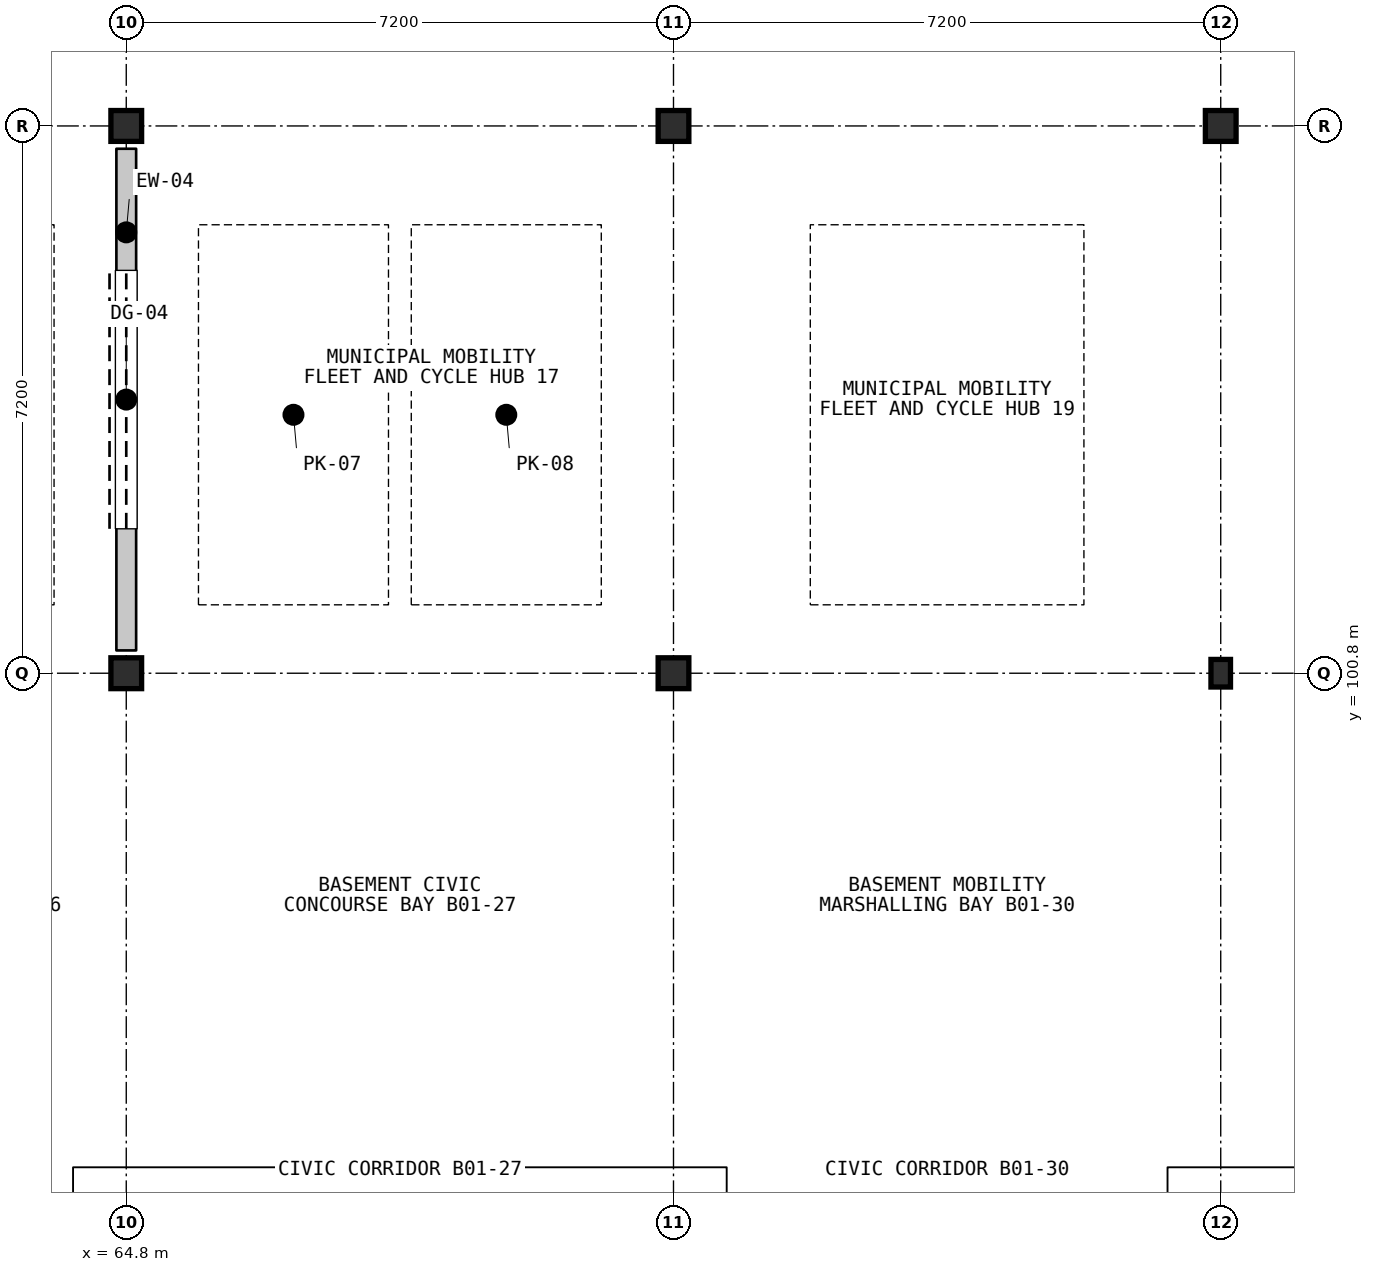
"""IFC4 building model, lengths in metres.
Left out: names, types, materials, properties, quantities, classifications, styles, units other than length and angle.
Written with IfcOpenShell. Run it as: python <this file> out.ifc"""

import sys

from ifc_helpers import new_model, si_unit, direction, frame, frame_2d, origin, origin_2d, place, context, subcontext, project, spatial, rectangle, i_section, extrude, element, fill, save


model = new_model("IFC4")
c1 = context("Model", 3, precision=1e-05, world=origin(), true_north=direction((0.0, 1.0)))
c2 = subcontext(c1, "Body", "Model", "MODEL_VIEW")
j1 = project(units=[si_unit("LENGTHUNIT", "METRE"), si_unit("PLANEANGLEUNIT", "RADIAN")], contexts=[c1])
p1 = place(None, origin())
s1 = spatial("IfcSite", under=j1, at=p1, CompositionType="ELEMENT")
p2 = place(p1, origin())
s2 = spatial("IfcBuilding", under=s1, at=p2, CompositionType="ELEMENT")
p3 = place(p2, frame((0.0, 0.0, -4.2)))
s3 = spatial("IfcBuildingStorey", under=s2, at=p3, CompositionType="ELEMENT", Elevation=-4.2)
for number, where, z_axis, x_axis in (
    (1, (64.8, 100.8, 0.0), (0.0, 0.0, 1.0), (1.0, 0.0, 0.0)),
    (2, (64.8, 108.0, 0.0), (0.0, 0.0, 1.0), (1.0, 0.0, 0.0)),
    (3, (72.0, 100.8, 0.0), (0.0, 0.0, 1.0), (1.0, 0.0, 0.0)),
    (4, (72.0, 108.0, 0.0), (0.0, 0.0, 1.0), (1.0, 0.0, 0.0)),
):
    element("IfcColumn", number, at=place(p3, frame(where, z_axis=z_axis, x_axis=x_axis)), inside=s3, PredefinedType="COLUMN", context=c2, shape_type="SweptSolid", body=[
        extrude(i_section(OverallWidth=0.404, OverallDepth=0.406, WebThickness=0.027, FlangeThickness=0.044, FilletRadius=0.015, at=origin_2d()), origin(), (0.0, 0.0, 1.0), 4.2),
    ])
p4 = place(p3, frame((79.2, 100.8, 0.0), z_axis=(0.0, 0.0, 1.0), x_axis=(1.0, 0.0, 0.0)))
e5 = element("IfcColumn", 5, at=p4, inside=s3, PredefinedType="COLUMN", context=c2, shape_type="SweptSolid", body=[
    extrude(i_section(OverallWidth=0.257, OverallDepth=0.363, WebThickness=0.013, FlangeThickness=0.022, FilletRadius=0.015, at=origin_2d()), origin(), (0.0, 0.0, 1.0), 4.2),
])
p5 = place(p3, frame((79.2, 108.0, 0.0), z_axis=(0.0, 0.0, 1.0), x_axis=(1.0, 0.0, 0.0)))
e6 = element("IfcColumn", 6, at=p5, inside=s3, PredefinedType="COLUMN", context=c2, shape_type="SweptSolid", body=[
    extrude(i_section(OverallWidth=0.404, OverallDepth=0.406, WebThickness=0.027, FlangeThickness=0.044, FilletRadius=0.015, at=origin_2d()), origin(), (0.0, 0.0, 1.0), 4.2),
])
p6 = place(p3, frame((64.8, 101.1, 0.0), z_axis=(0.0, 0.0, 1.0), x_axis=(0.0, 1.0, 0.0)))
e7 = element("IfcWall", 7, at=p6, inside=s3, PredefinedType="SOLIDWALL", context=c2, shape_type="SweptSolid", body=[
    extrude(rectangle(XDim=6.6, YDim=0.26, at=frame_2d((3.3, 0.0))), origin(), (0.0, 0.0, 1.0), 3.22),
])
p7 = place(p6, frame((1.6, 0.0, 0.0)))
e8 = element("IfcOpeningElement", 8, at=p7, cuts=e7, PredefinedType="OPENING", context=c2, shape_type="SweptSolid", body=[
    extrude(rectangle(XDim=3.4, YDim=2.95, at=frame_2d((1.7, 1.475))), frame((0.0, 0.14, 0.0), z_axis=(0.0, -1.0, 0.0), x_axis=(1.0, 0.0, 0.0)), (0.0, 0.0, 1.0), 0.28),
])
p8 = place(p7, origin())
e9 = element("IfcDoor", 9, at=p8, inside=s3, OperationType="ROLLINGUP", PredefinedType="GATE", context=c2, shape_type="SweptSolid", body=[
    extrude(rectangle(XDim=3.4, YDim=2.95, at=frame_2d((1.7, 1.475))), frame((0.0, 0.025, 0.0), z_axis=(0.0, -1.0, 0.0), x_axis=(1.0, 0.0, 0.0)), (0.0, 0.0, 1.0), 0.05),
])
fill(e8, e9)
save(model, sys.argv[1])
